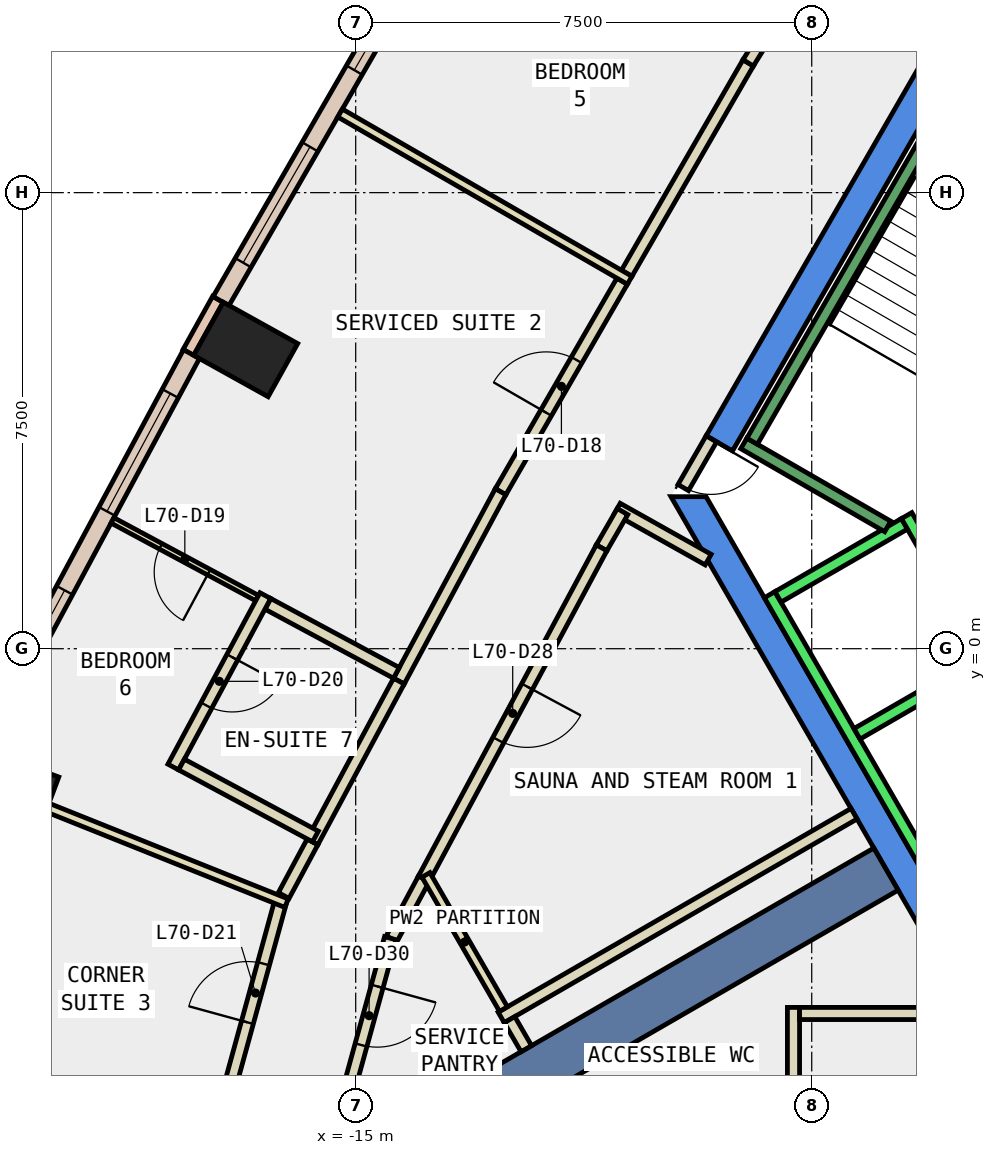
"""IFC4 building model, lengths in metres.
Left out: names, types, materials, properties, quantities, classifications, styles, units other than length and angle.
Written with IfcOpenShell. Run it as: python <this file> out.ifc"""

import sys

from ifc_helpers import new_model, si_unit, direction, frame, frame_2d, origin, origin_2d, place, context, subcontext, project, spatial, polyline, rectangle, outline, extrude, element, fill, save


model = new_model("IFC4")
c1 = context("Model", 3, precision=1e-05, world=origin(), true_north=direction((0.0, 1.0)))
c2 = subcontext(c1, "Body", "Model", "MODEL_VIEW")
j1 = project(units=[si_unit("LENGTHUNIT", "METRE"), si_unit("PLANEANGLEUNIT", "RADIAN")], contexts=[c1])
p1 = place(None, origin())
s1 = spatial("IfcSite", under=j1, at=p1, CompositionType="ELEMENT")
p2 = place(p1, origin())
s2 = spatial("IfcBuilding", under=s1, at=p2, CompositionType="ELEMENT")
p3 = place(p2, frame((0.0, 0.0, 300.8)))
s3 = spatial("IfcBuildingStorey", under=s2, at=p3, CompositionType="ELEMENT", Elevation=300.8)
for number, where, z_axis, x_axis in (
    (1, (-16.809, 4.921, -0.34), (0.0, 0.0, 1.0), (0.486, 0.874, 0.0)),
    (2, (-20.714, -2.333, -0.34), (0.0, 0.0, 1.0), (0.351, 0.936, 0.0)),
):
    element("IfcColumn", number, at=place(p3, frame(where, z_axis=z_axis, x_axis=x_axis)), inside=s3, PredefinedType="COLUMN", context=c2, shape_type="SweptSolid", body=[
        extrude(rectangle(XDim=1.0, YDim=1.4, at=origin_2d()), origin(), (0.0, 0.0, 1.0), 3.6),
    ])
p4 = place(p3, frame((0.0, 0.0, -0.34)))
e3 = element("IfcWall", 3, at=p4, inside=s3, PredefinedType="SHEAR", context=c2, shape_type="SweptSolid", body=[
    extrude(outline(polyline([(-9.236, 3.502), (-8.803, 3.253), (-4.619, 10.5), (-4.907, 11.0), (-9.236, 3.502)])), origin(), (0.0, 0.0, 1.0), 3.6),
])
p5 = place(p3, frame((0.0, 0.0, -0.34)))
e4 = element("IfcWall", 4, at=p5, inside=s3, PredefinedType="SHEAR", context=c2, shape_type="SweptSolid", body=[
    extrude(outline(polyline([(-9.815, 2.5), (-4.907, -6.0), (-4.619, -5.5), (-9.238, 2.5), (-9.815, 2.5)])), origin(), (0.0, 0.0, 1.0), 3.6),
])
p6 = place(p3, frame((-6.279, -3.625, -0.34), z_axis=(0.0, 0.0, 1.0), x_axis=(-0.866017533419, -0.500013631625, 0.0)))
e5 = element("IfcWall", 5, at=p6, inside=s3, PredefinedType="SHEAR", context=c2, shape_type="SweptSolid", body=[
    extrude(rectangle(XDim=9.0, YDim=0.8, at=frame_2d((4.5, 0.0))), origin(), (0.0, 0.0, 1.0), 3.6),
])
p7 = place(p3, frame((-17.266, 5.746, 0.0), z_axis=(0.0, 0.0, 1.0), x_axis=(-0.485850211157, -0.874042088414, 0.0)))
e6 = element("IfcWall", 6, at=p7, inside=s3, PredefinedType="STANDARD", context=c2, shape_type="SweptSolid", body=[
    extrude(rectangle(XDim=1.0, YDim=0.2, at=frame_2d((0.5, 0.0))), origin(), (0.0, 0.0, 1.0), 3.26),
])
p8 = place(p3, frame((-13.559, 12.051, 0.0), z_axis=(0.0, 0.0, 1.0), x_axis=(-0.499905472729, -0.866079972252, 0.0)))
e7 = element("IfcWall", 7, at=p8, inside=s3, PredefinedType="STANDARD", context=c2, shape_type="SweptSolid", body=[
    extrude(rectangle(XDim=7.313, YDim=0.3, at=frame_2d((3.657, 0.0))), origin(), (0.0, 0.0, 1.0), 3.26),
])
p9 = place(p8, frame((0.728, 0.0, 0.9)))
e8 = element("IfcOpeningElement", 8, at=p9, cuts=e7, PredefinedType="OPENING", context=c2, shape_type="SweptSolid", body=[
    extrude(rectangle(XDim=2.2, YDim=2.0, at=frame_2d((1.1, 1.0))), frame((0.0, 0.16, 0.0), z_axis=(0.0, -1.0, 0.0), x_axis=(1.0, 0.0, 0.0)), (0.0, 0.0, 1.0), 0.32),
])
p10 = place(p8, frame((4.385, 0.0, 0.9)))
e9 = element("IfcOpeningElement", 9, at=p10, cuts=e7, PredefinedType="OPENING", context=c2, shape_type="SweptSolid", body=[
    extrude(rectangle(XDim=2.2, YDim=2.0, at=frame_2d((1.1, 1.0))), frame((0.0, 0.16, 0.0), z_axis=(0.0, -1.0, 0.0), x_axis=(1.0, 0.0, 0.0)), (0.0, 0.0, 1.0), 0.32),
])
p11 = place(p3, frame((-17.701, 4.845, 0.0), z_axis=(0.0, 0.0, 1.0), x_axis=(-0.473225522632, -0.880941317415, 0.0)))
e10 = element("IfcWall", 10, at=p11, inside=s3, PredefinedType="STANDARD", context=c2, shape_type="SweptSolid", body=[
    extrude(rectangle(XDim=7.345, YDim=0.3, at=frame_2d((3.673, 0.0))), origin(), (0.0, 0.0, 1.0), 3.26),
])
p12 = place(p11, frame((0.736, 0.0, 0.9)))
e11 = element("IfcOpeningElement", 11, at=p12, cuts=e10, PredefinedType="OPENING", context=c2, shape_type="SweptSolid", body=[
    extrude(rectangle(XDim=2.2, YDim=2.0, at=frame_2d((1.1, 1.0))), frame((0.0, 0.16, 0.0), z_axis=(0.0, -1.0, 0.0), x_axis=(1.0, 0.0, 0.0)), (0.0, 0.0, 1.0), 0.32),
])
p13 = place(p11, frame((4.409, 0.0, 0.9)))
e12 = element("IfcOpeningElement", 12, at=p13, cuts=e10, PredefinedType="OPENING", context=c2, shape_type="SweptSolid", body=[
    extrude(rectangle(XDim=2.2, YDim=2.0, at=frame_2d((1.1, 1.0))), frame((0.0, 0.16, 0.0), z_axis=(0.0, -1.0, 0.0), x_axis=(1.0, 0.0, 0.0)), (0.0, 0.0, 1.0), 0.32),
])
p14 = place(p3, frame((-9.203, 1.465, 0.0), z_axis=(0.0, 0.0, 1.0), x_axis=(-0.872243753731, 0.489071399775, 0.0)))
e13 = element("IfcWall", 13, at=p14, inside=s3, PredefinedType="PARTITIONING", context=c2, shape_type="SweptSolid", body=[
    extrude(rectangle(XDim=1.715, YDim=0.2, at=frame_2d((0.858, 0.0))), origin(), (0.0, 0.0, 1.0), 3.26),
])
p15 = place(p3, frame((-10.612, 2.255, 0.0), z_axis=(0.0, 0.0, 1.0), x_axis=(-0.499916971989, -0.866073334723, 0.0)))
e14 = element("IfcWall", 14, at=p15, inside=s3, PredefinedType="PARTITIONING", context=c2, shape_type="SweptSolid", body=[
    extrude(rectangle(XDim=0.688, YDim=0.2, at=frame_2d((0.344, 0.0))), origin(), (0.0, 0.0, 1.0), 3.26),
])
p16 = place(p3, frame((-10.956, 1.659, 0.0), z_axis=(0.0, 0.0, 1.0), x_axis=(-0.473095976848, -0.881010894762, 0.0)))
e15 = element("IfcWall", 15, at=p16, inside=s3, PredefinedType="PARTITIONING", context=c2, shape_type="SweptSolid", body=[
    extrude(rectangle(XDim=6.18, YDim=0.2, at=frame_2d((3.09, 0.0))), origin(), (0.0, 0.0, 1.0), 3.26),
])
p17 = place(p16, frame((2.59, 0.0, 0.0)))
e16 = element("IfcOpeningElement", 16, at=p17, cuts=e15, PredefinedType="OPENING", context=c2, shape_type="SweptSolid", body=[
    extrude(rectangle(XDim=1.0, YDim=2.1, at=frame_2d((0.5, 1.05))), frame((0.0, 0.11, 0.0), z_axis=(0.0, -1.0, 0.0), x_axis=(1.0, 0.0, 0.0)), (0.0, 0.0, 1.0), 0.22),
])
p18 = place(p3, frame((-13.88, -3.786, 0.0), z_axis=(0.0, 0.0, 1.0), x_axis=(-0.473500327913, -0.880793641817, 0.0)))
e17 = element("IfcWall", 17, at=p18, inside=s3, PredefinedType="PARTITIONING", context=c2, shape_type="SweptSolid", body=[
    extrude(rectangle(XDim=1.117, YDim=0.2, at=frame_2d((0.559, 0.0))), origin(), (0.0, 0.0, 1.0), 3.26),
])
p19 = place(p3, frame((-14.429, -4.761, 0.0), z_axis=(0.0, 0.0, 1.0), x_axis=(-0.265321869293, -0.964159896321, 0.0)))
e18 = element("IfcWall", 18, at=p19, inside=s3, PredefinedType="PARTITIONING", context=c2, shape_type="SweptSolid", body=[
    extrude(rectangle(XDim=2.642, YDim=0.2, at=frame_2d((1.321, 0.0))), origin(), (0.0, 0.0, 1.0), 3.26),
])
p20 = place(p19, frame((0.821, 0.0, 0.0)))
e19 = element("IfcOpeningElement", 19, at=p20, cuts=e18, PredefinedType="OPENING", context=c2, shape_type="SweptSolid", body=[
    extrude(rectangle(XDim=1.0, YDim=2.1, at=frame_2d((0.5, 1.05))), frame((0.0, 0.11, 0.0), z_axis=(0.0, -1.0, 0.0), x_axis=(1.0, 0.0, 0.0)), (0.0, 0.0, 1.0), 0.22),
])
p21 = place(p3, frame((-10.543, 6.174, 0.0), z_axis=(0.0, 0.0, 1.0), x_axis=(0.50008212199, 0.86597798544, 0.0)))
e20 = element("IfcWall", 20, at=p21, inside=s3, PredefinedType="PARTITIONING", context=c2, shape_type="SweptSolid", body=[
    extrude(rectangle(XDim=3.995, YDim=0.2, at=frame_2d((1.998, 0.0))), origin(), (0.0, 0.0, 1.0), 3.26),
])
p22 = place(p3, frame((-8.545, 9.634, 0.0), z_axis=(0.0, 0.0, 1.0), x_axis=(0.52594604986, 0.85051793199, 0.0)))
e21 = element("IfcWall", 21, at=p22, inside=s3, PredefinedType="PARTITIONING", context=c2, shape_type="SweptSolid", body=[
    extrude(rectangle(XDim=0.699, YDim=0.2, at=frame_2d((0.35, 0.0))), origin(), (0.0, 0.0, 1.0), 3.26),
])
p23 = place(p3, frame((-14.29, -0.533, 0.0), z_axis=(0.0, 0.0, 1.0), x_axis=(0.473161350875, 0.880975786295, 0.0)))
e22 = element("IfcWall", 22, at=p23, inside=s3, PredefinedType="PARTITIONING", context=c2, shape_type="SweptSolid", body=[
    extrude(rectangle(XDim=3.538, YDim=0.2, at=frame_2d((1.769, 0.0))), origin(), (0.0, 0.0, 1.0), 3.26),
])
p24 = place(p3, frame((-12.616, 2.584, 0.0), z_axis=(0.0, 0.0, 1.0), x_axis=(0.50008212199, 0.86597798544, 0.0)))
e23 = element("IfcWall", 23, at=p24, inside=s3, PredefinedType="PARTITIONING", context=c2, shape_type="SweptSolid", body=[
    extrude(rectangle(XDim=3.995, YDim=0.2, at=frame_2d((1.998, 0.0))), origin(), (0.0, 0.0, 1.0), 3.26),
])
p25 = place(p24, frame((1.498, 0.0, 0.0)))
e24 = element("IfcOpeningElement", 24, at=p25, cuts=e23, PredefinedType="OPENING", context=c2, shape_type="SweptSolid", body=[
    extrude(rectangle(XDim=1.0, YDim=2.1, at=frame_2d((0.5, 1.05))), frame((0.0, 0.11, 0.0), z_axis=(0.0, -1.0, 0.0), x_axis=(1.0, 0.0, 0.0)), (0.0, 0.0, 1.0), 0.22),
])
p26 = place(p3, frame((-16.184, -4.059, 0.0), z_axis=(0.0, 0.0, 1.0), x_axis=(0.473039108954, 0.881041430013, 0.0)))
e25 = element("IfcWall", 25, at=p26, inside=s3, PredefinedType="PARTITIONING", context=c2, shape_type="SweptSolid", body=[
    extrude(rectangle(XDim=1.002, YDim=0.2, at=frame_2d((0.501, 0.0))), origin(), (0.0, 0.0, 1.0), 3.26),
])
p27 = place(p3, frame((-15.71, -3.176, 0.0), z_axis=(0.0, 0.0, 1.0), x_axis=(0.473255284848, 0.880925329051, 0.0)))
e26 = element("IfcWall", 26, at=p27, inside=s3, PredefinedType="PARTITIONING", context=c2, shape_type="SweptSolid", body=[
    extrude(rectangle(XDim=3.0, YDim=0.2, at=frame_2d((1.5, 0.0))), origin(), (0.0, 0.0, 1.0), 3.26),
])
p28 = place(p3, frame((-17.097, -7.297, 0.0), z_axis=(0.0, 0.0, 1.0), x_axis=(0.264861686213, 0.964286413456, 0.0)))
e27 = element("IfcWall", 27, at=p28, inside=s3, PredefinedType="PARTITIONING", context=c2, shape_type="SweptSolid", body=[
    extrude(rectangle(XDim=3.292, YDim=0.2, at=frame_2d((1.646, 0.0))), origin(), (0.0, 0.0, 1.0), 3.26),
])
p29 = place(p28, frame((1.195, 0.0, 0.0)))
e28 = element("IfcOpeningElement", 28, at=p29, cuts=e27, PredefinedType="OPENING", context=c2, shape_type="SweptSolid", body=[
    extrude(rectangle(XDim=1.0, YDim=2.1, at=frame_2d((0.5, 1.05))), frame((0.0, 0.11, 0.0), z_axis=(0.0, -1.0, 0.0), x_axis=(1.0, 0.0, 0.0)), (0.0, 0.0, 1.0), 0.22),
])
p30 = place(p3, frame((-7.8, -10.559, 0.0), z_axis=(0.0, 0.0, 1.0), x_axis=(0.0, 1.0, 0.0)))
e29 = element("IfcWall", 29, at=p30, inside=s3, PredefinedType="PARTITIONING", context=c2, shape_type="SweptSolid", body=[
    extrude(rectangle(XDim=4.66, YDim=0.2, at=frame_2d((2.33, 0.0))), origin(), (0.0, 0.0, 1.0), 3.26),
])
p31 = place(p30, frame((1.83, 0.0, 0.0)))
e30 = element("IfcOpeningElement", 30, at=p31, cuts=e29, PredefinedType="OPENING", context=c2, shape_type="SweptSolid", body=[
    extrude(rectangle(XDim=1.0, YDim=2.1, at=frame_2d((0.5, 1.05))), frame((0.0, 0.11, 0.0), z_axis=(0.0, -1.0, 0.0), x_axis=(1.0, 0.0, 0.0)), (0.0, 0.0, 1.0), 0.22),
])
p32 = place(p3, frame((-7.7, -5.999, 0.0), z_axis=(0.0, 0.0, 1.0), x_axis=(1.0, 0.0, 0.0)))
e31 = element("IfcWall", 31, at=p32, inside=s3, PredefinedType="PARTITIONING", context=c2, shape_type="SweptSolid", body=[
    extrude(rectangle(XDim=2.792, YDim=0.2, at=frame_2d((1.396, 0.0))), origin(), (0.0, 0.0, 1.0), 3.26),
])
p33 = place(p3, frame((-6.804, -2.714, 0.0), z_axis=(0.0, 0.0, 1.0), x_axis=(-0.866057565063, -0.499944290893, 0.0)))
e32 = element("IfcWall", 32, at=p33, inside=s3, PredefinedType="PARTITIONING", context=c2, shape_type="SweptSolid", body=[
    extrude(rectangle(XDim=6.7, YDim=0.2, at=frame_2d((3.35, 0.0))), origin(), (0.0, 0.0, 1.0), 3.26),
])
p34 = place(p3, frame((-12.57, -5.927, 0.0), z_axis=(0.0, 0.0, 1.0), x_axis=(-0.500197803108, 0.865911171983, 0.0)))
e33 = element("IfcWall", 33, at=p34, inside=s3, PredefinedType="PARTITIONING", context=c2, shape_type="SweptSolid", body=[
    extrude(rectangle(XDim=2.549, YDim=0.15, at=frame_2d((1.274, 0.0))), origin(), (0.0, 0.0, 1.0), 3.26),
])
p35 = place(p3, frame((-12.194, -6.578, 0.0), z_axis=(0.0, 0.0, 1.0), x_axis=(-0.500809139387, 0.865557742676, 0.0)))
e34 = element("IfcWall", 34, at=p35, inside=s3, PredefinedType="PARTITIONING", context=c2, shape_type="SweptSolid", body=[
    extrude(rectangle(XDim=0.551, YDim=0.2, at=frame_2d((0.275, 0.0))), origin(), (0.0, 0.0, 1.0), 3.26),
])
p36 = place(p3, frame((-10.494, 6.059, 0.0), z_axis=(0.0, 0.0, 1.0), x_axis=(-0.866027397988, 0.499996545922, 0.0)))
e35 = element("IfcWall", 35, at=p36, inside=s3, PredefinedType="PARTITIONING", context=c2, shape_type="SweptSolid", body=[
    extrude(rectangle(XDim=5.5, YDim=0.15, at=frame_2d((2.75, 0.0))), origin(), (0.0, 0.0, 1.0), 3.26),
])
p37 = place(p3, frame((-16.621, 0.832, 0.0), z_axis=(0.0, 0.0, 1.0), x_axis=(-0.880914863524, 0.47327476504, 0.0)))
e36 = element("IfcWall", 36, at=p37, inside=s3, PredefinedType="PARTITIONING", context=c2, shape_type="SweptSolid", body=[
    extrude(rectangle(XDim=2.7, YDim=0.1, at=frame_2d((1.35, 0.0))), origin(), (0.0, 0.0, 1.0), 3.26),
])
p38 = place(p37, frame((0.9, 0.0, 0.0)))
e37 = element("IfcOpeningElement", 37, at=p38, cuts=e36, PredefinedType="OPENING", context=c2, shape_type="SweptSolid", body=[
    extrude(rectangle(XDim=0.9, YDim=2.1, at=frame_2d((0.45, 1.05))), frame((0.0, 0.06, 0.0), z_axis=(0.0, -1.0, 0.0), x_axis=(1.0, 0.0, 0.0)), (0.0, 0.0, 1.0), 0.12),
])
p39 = place(p3, frame((-14.331, -0.398, 0.0), z_axis=(0.0, 0.0, 1.0), x_axis=(-0.880875830026, 0.473347411608, 0.0)))
e38 = element("IfcWall", 38, at=p39, inside=s3, PredefinedType="PARTITIONING", context=c2, shape_type="SweptSolid", body=[
    extrude(rectangle(XDim=2.4, YDim=0.2, at=frame_2d((1.2, 0.0))), origin(), (0.0, 0.0, 1.0), 3.26),
])
p40 = place(p3, frame((-16.486, 0.873, 0.0), z_axis=(0.0, 0.0, 1.0), x_axis=(-0.473116768279, -0.88099972961, 0.0)))
e39 = element("IfcWall", 39, at=p40, inside=s3, PredefinedType="PARTITIONING", context=c2, shape_type="SweptSolid", body=[
    extrude(rectangle(XDim=3.2, YDim=0.2, at=frame_2d((1.6, 0.0))), origin(), (0.0, 0.0, 1.0), 3.26),
])
p41 = place(p40, frame((1.15, 0.0, 0.0)))
e40 = element("IfcOpeningElement", 40, at=p41, cuts=e39, PredefinedType="OPENING", context=c2, shape_type="SweptSolid", body=[
    extrude(rectangle(XDim=0.9, YDim=2.1, at=frame_2d((0.45, 1.05))), frame((0.0, 0.11, 0.0), z_axis=(0.0, -1.0, 0.0), x_axis=(1.0, 0.0, 0.0)), (0.0, 0.0, 1.0), 0.22),
])
p42 = place(p3, frame((-17.865, -1.905, 0.0), z_axis=(0.0, 0.0, 1.0), x_axis=(0.881022314299, -0.473074710493, 0.0)))
e41 = element("IfcWall", 41, at=p42, inside=s3, PredefinedType="PARTITIONING", context=c2, shape_type="SweptSolid", body=[
    extrude(rectangle(XDim=2.5, YDim=0.2, at=frame_2d((1.25, 0.0))), origin(), (0.0, 0.0, 1.0), 3.26),
])
p43 = place(p3, frame((-16.138, -4.185, 0.0), z_axis=(0.0, 0.0, 1.0), x_axis=(-0.928432751736, 0.371500505388, 0.0)))
e42 = element("IfcWall", 42, at=p43, inside=s3, PredefinedType="PARTITIONING", context=c2, shape_type="SweptSolid", body=[
    extrude(rectangle(XDim=4.216, YDim=0.15, at=frame_2d((2.108, 0.0))), origin(), (0.0, 0.0, 1.0), 3.26),
])
p44 = place(p3, frame((-9.15, 3.452, 0.0), z_axis=(0.0, 0.0, 1.0), x_axis=(-0.500079945886, -0.865979242085, 0.0)))
e43 = element("IfcWall", 43, at=p44, inside=s3, PredefinedType="PARTITIONING", context=c2, shape_type="SweptSolid", body=[
    extrude(rectangle(XDim=0.926, YDim=0.2, at=frame_2d((0.463, 0.0))), origin(), (0.0, 0.0, 1.0), 2.4),
])
p45 = place(p44, frame((0.017, 0.0, 0.0)))
e44 = element("IfcOpeningElement", 44, at=p45, cuts=e43, PredefinedType="OPENING", context=c2, shape_type="SweptSolid", body=[
    extrude(rectangle(XDim=0.9, YDim=2.1, at=frame_2d((0.45, 1.05))), frame((0.0, 0.11, 0.0), z_axis=(0.0, -1.0, 0.0), x_axis=(1.0, 0.0, 0.0)), (0.0, 0.0, 1.0), 0.22),
])
p46 = place(p3, frame((-5.94, 2.188, 0.0), z_axis=(0.0, 0.0, 1.0), x_axis=(0.500034260056, -0.866005622828, 0.0)))
e45 = element("IfcWall", 45, at=p46, inside=s3, PredefinedType="STANDARD", context=c2, shape_type="SweptSolid", body=[
    extrude(rectangle(XDim=5.399, YDim=0.2, at=frame_2d((2.7, 0.0))), origin(), (0.0, 0.0, 1.0), 3.26),
])
p47 = place(p46, frame((3.075, 0.0, 0.0)))
e46 = element("IfcOpeningElement", 46, at=p47, cuts=e45, PredefinedType="OPENING", context=c2, shape_type="SweptSolid", body=[
    extrude(rectangle(XDim=1.1, YDim=2.1, at=frame_2d((0.55, 1.05))), frame((0.0, 0.11, 0.0), z_axis=(0.0, -1.0, 0.0), x_axis=(1.0, 0.0, 0.0)), (0.0, 0.0, 1.0), 0.22),
])
p48 = place(p46, frame((1.225, 0.0, 0.0)))
e47 = element("IfcOpeningElement", 47, at=p48, cuts=e45, PredefinedType="OPENING", context=c2, shape_type="SweptSolid", body=[
    extrude(rectangle(XDim=1.1, YDim=2.1, at=frame_2d((0.55, 1.05))), frame((0.0, 0.11, 0.0), z_axis=(0.0, -1.0, 0.0), x_axis=(1.0, 0.0, 0.0)), (0.0, 0.0, 1.0), 0.22),
])
p49 = place(p3, frame((-8.192, 0.888, 0.0), z_axis=(0.0, 0.0, 1.0), x_axis=(0.500034260056, -0.866005622828, 0.0)))
e48 = element("IfcWall", 48, at=p49, inside=s3, PredefinedType="STANDARD", context=c2, shape_type="SweptSolid", body=[
    extrude(rectangle(XDim=5.399, YDim=0.2, at=frame_2d((2.7, 0.0))), origin(), (0.0, 0.0, 1.0), 3.26),
])
for number, where, z_axis, x_axis in (
    (49, (-5.977, 2.052, 0.0), (0.0, 0.0, 1.0), (-0.866, -0.5, 0.0)),
    (50, (-4.677, -0.2, 0.0), (0.0, 0.0, 1.0), (-0.866, -0.5, 0.0)),
):
    element("IfcWall", number, at=place(p3, frame(where, z_axis=z_axis, x_axis=x_axis)), inside=s3, PredefinedType="STANDARD", context=c2, shape_type="SweptSolid", body=[
        extrude(rectangle(XDim=2.399, YDim=0.2, at=frame_2d((1.2, 0.0))), origin(), (0.0, 0.0, 1.0), 3.26),
    ])
p50 = place(p3, frame((-6.25, 2.01, 0.0), z_axis=(0.0, 0.0, 1.0), x_axis=(-0.86611865017, 0.499838457731, 0.0)))
e51 = element("IfcWall", 51, at=p50, inside=s3, PredefinedType="STANDARD", context=c2, shape_type="SweptSolid", body=[
    extrude(rectangle(XDim=2.733, YDim=0.2, at=frame_2d((1.366, 0.0))), origin(), (0.0, 0.0, 1.0), 3.26),
])
p51 = place(p3, frame((-5.03, 9.388, 0.0), z_axis=(0.0, 0.0, 1.0), x_axis=(-0.499978703459, -0.866037698999, 0.0)))
e52 = element("IfcWall", 52, at=p51, inside=s3, PredefinedType="STANDARD", context=c2, shape_type="SweptSolid", body=[
    extrude(rectangle(XDim=6.9, YDim=0.2, at=frame_2d((3.45, 0.0))), origin(), (0.0, 0.0, 1.0), 3.26),
])
p52 = place(p9, origin())
e53 = element("IfcWindow", 53, at=p52, inside=s3, PartitioningType="SINGLE_PANEL", PredefinedType="WINDOW", context=c2, shape_type="SweptSolid", body=[
    extrude(rectangle(XDim=2.2, YDim=2.0, at=frame_2d((1.1, 1.0))), frame((0.0, 0.03, 0.0), z_axis=(0.0, -1.0, 0.0), x_axis=(1.0, 0.0, 0.0)), (0.0, 0.0, 1.0), 0.06),
])
fill(e8, e53)
p53 = place(p10, origin())
e54 = element("IfcWindow", 54, at=p53, inside=s3, PartitioningType="SINGLE_PANEL", PredefinedType="WINDOW", context=c2, shape_type="SweptSolid", body=[
    extrude(rectangle(XDim=2.2, YDim=2.0, at=frame_2d((1.1, 1.0))), frame((0.0, 0.03, 0.0), z_axis=(0.0, -1.0, 0.0), x_axis=(1.0, 0.0, 0.0)), (0.0, 0.0, 1.0), 0.06),
])
fill(e9, e54)
p54 = place(p12, origin())
e55 = element("IfcWindow", 55, at=p54, inside=s3, PartitioningType="SINGLE_PANEL", PredefinedType="WINDOW", context=c2, shape_type="SweptSolid", body=[
    extrude(rectangle(XDim=2.2, YDim=2.0, at=frame_2d((1.1, 1.0))), frame((0.0, 0.03, 0.0), z_axis=(0.0, -1.0, 0.0), x_axis=(1.0, 0.0, 0.0)), (0.0, 0.0, 1.0), 0.06),
])
fill(e11, e55)
p55 = place(p13, origin())
e56 = element("IfcWindow", 56, at=p55, inside=s3, PartitioningType="SINGLE_PANEL", PredefinedType="WINDOW", context=c2, shape_type="SweptSolid", body=[
    extrude(rectangle(XDim=2.2, YDim=2.0, at=frame_2d((1.1, 1.0))), frame((0.0, 0.03, 0.0), z_axis=(0.0, -1.0, 0.0), x_axis=(1.0, 0.0, 0.0)), (0.0, 0.0, 1.0), 0.06),
])
fill(e12, e56)
p56 = place(p25, origin())
e57 = element("IfcDoor", 57, at=p56, inside=s3, OperationType="SINGLE_SWING_LEFT", PredefinedType="DOOR", context=c2, shape_type="SweptSolid", body=[
    extrude(rectangle(XDim=1.0, YDim=2.1, at=frame_2d((0.5, 1.05))), frame((0.0, 0.025, 0.0), z_axis=(0.0, -1.0, 0.0), x_axis=(1.0, 0.0, 0.0)), (0.0, 0.0, 1.0), 0.05),
])
fill(e24, e57)
p57 = place(p38, origin())
e58 = element("IfcDoor", 58, at=p57, inside=s3, OperationType="SINGLE_SWING_LEFT", PredefinedType="DOOR", context=c2, shape_type="SweptSolid", body=[
    extrude(rectangle(XDim=0.9, YDim=2.1, at=frame_2d((0.45, 1.05))), frame((0.0, 0.025, 0.0), z_axis=(0.0, -1.0, 0.0), x_axis=(1.0, 0.0, 0.0)), (0.0, 0.0, 1.0), 0.05),
])
fill(e37, e58)
p58 = place(p41, origin())
e59 = element("IfcDoor", 59, at=p58, inside=s3, OperationType="SINGLE_SWING_LEFT", PredefinedType="DOOR", context=c2, shape_type="SweptSolid", body=[
    extrude(rectangle(XDim=0.9, YDim=2.1, at=frame_2d((0.45, 1.05))), frame((0.0, 0.025, 0.0), z_axis=(0.0, -1.0, 0.0), x_axis=(1.0, 0.0, 0.0)), (0.0, 0.0, 1.0), 0.05),
])
fill(e40, e59)
p59 = place(p29, origin())
e60 = element("IfcDoor", 60, at=p59, inside=s3, OperationType="SINGLE_SWING_RIGHT", PredefinedType="DOOR", context=c2, shape_type="SweptSolid", body=[
    extrude(rectangle(XDim=1.0, YDim=2.1, at=frame_2d((0.5, 1.05))), frame((0.0, 0.025, 0.0), z_axis=(0.0, -1.0, 0.0), x_axis=(1.0, 0.0, 0.0)), (0.0, 0.0, 1.0), 0.05),
])
fill(e28, e60)
p60 = place(p17, origin())
e61 = element("IfcDoor", 61, at=p60, inside=s3, OperationType="SINGLE_SWING_LEFT", PredefinedType="DOOR", context=c2, shape_type="SweptSolid", body=[
    extrude(rectangle(XDim=1.0, YDim=2.1, at=frame_2d((0.5, 1.05))), frame((0.0, 0.025, 0.0), z_axis=(0.0, -1.0, 0.0), x_axis=(1.0, 0.0, 0.0)), (0.0, 0.0, 1.0), 0.05),
])
fill(e16, e61)
p61 = place(p20, origin())
e62 = element("IfcDoor", 62, at=p61, inside=s3, OperationType="SINGLE_SWING_LEFT", PredefinedType="DOOR", context=c2, shape_type="SweptSolid", body=[
    extrude(rectangle(XDim=1.0, YDim=2.1, at=frame_2d((0.5, 1.05))), frame((0.0, 0.025, 0.0), z_axis=(0.0, -1.0, 0.0), x_axis=(1.0, 0.0, 0.0)), (0.0, 0.0, 1.0), 0.05),
])
fill(e19, e62)
p62 = place(p45, origin())
e63 = element("IfcDoor", 63, at=p62, inside=s3, OperationType="SINGLE_SWING_LEFT", PredefinedType="DOOR", context=c2, shape_type="SweptSolid", body=[
    extrude(rectangle(XDim=0.9, YDim=2.1, at=frame_2d((0.45, 1.05))), frame((0.0, 0.025, 0.0), z_axis=(0.0, -1.0, 0.0), x_axis=(1.0, 0.0, 0.0)), (0.0, 0.0, 1.0), 0.05),
])
fill(e44, e63)
save(model, sys.argv[1])
